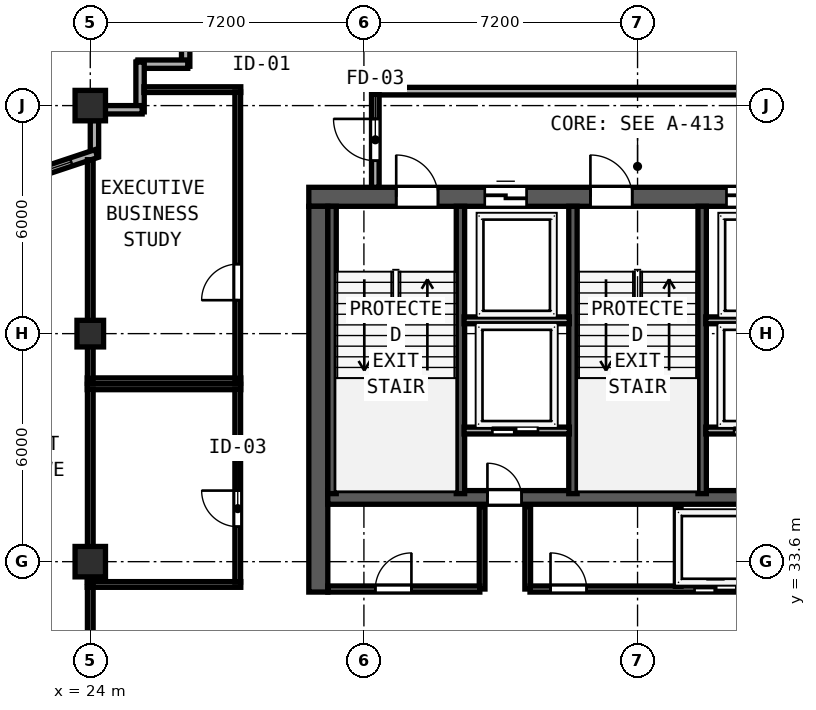
"""IFC4 building model, lengths in metres.
Left out: names, types, materials, properties, quantities, classifications, styles, units other than length and angle.
Written with IfcOpenShell. Run it as: python <this file> out.ifc"""

import sys

from ifc_helpers import new_model, si_unit, direction, frame, frame_2d, origin, origin_2d, place, context, subcontext, project, spatial, rectangle, hollow_rectangle, extrude, element, fill, save


model = new_model("IFC4")
c1 = context("Model", 3, precision=1e-05, world=origin(), true_north=direction((0.0, 1.0)))
c2 = subcontext(c1, "Body", "Model", "MODEL_VIEW")
j1 = project(units=[si_unit("LENGTHUNIT", "METRE"), si_unit("PLANEANGLEUNIT", "RADIAN")], contexts=[c1])
p1 = place(None, origin())
s1 = spatial("IfcSite", under=j1, at=p1, CompositionType="ELEMENT")
p2 = place(p1, origin())
s2 = spatial("IfcBuilding", under=s1, at=p2, CompositionType="ELEMENT")
p3 = place(p2, frame((0.0, 0.0, 239.05)))
s3 = spatial("IfcBuildingStorey", under=s2, at=p3, CompositionType="ELEMENT", Elevation=239.05)
p4 = place(p3, frame((29.75, 43.2, 0.0), z_axis=(0.0, 0.0, 1.0), x_axis=(1.0, 0.0, 0.0)))
e1 = element("IfcWall", 1, at=p4, inside=s3, PredefinedType="SHEAR", context=c2, shape_type="SweptSolid", body=[
    extrude(rectangle(XDim=17.3, YDim=0.5, at=frame_2d((8.65, 0.0))), origin(), (0.0, 0.0, 1.0), 3.67),
])
p5 = place(p4, frame((2.3, 0.0, 0.0)))
e2 = element("IfcOpeningElement", 2, at=p5, cuts=e1, PredefinedType="OPENING", context=c2, shape_type="SweptSolid", body=[
    extrude(rectangle(XDim=1.1, YDim=2.15, at=frame_2d((0.55, 1.075))), frame((0.0, 0.26, 0.0), z_axis=(0.0, -1.0, 0.0), x_axis=(1.0, 0.0, 0.0)), (0.0, 0.0, 1.0), 0.52),
])
p6 = place(p4, frame((7.41, 0.0, 0.0)))
e3 = element("IfcOpeningElement", 3, at=p6, cuts=e1, PredefinedType="OPENING", context=c2, shape_type="SweptSolid", body=[
    extrude(rectangle(XDim=1.1, YDim=2.15, at=frame_2d((0.55, 1.075))), frame((0.0, 0.26, 0.0), z_axis=(0.0, -1.0, 0.0), x_axis=(1.0, 0.0, 0.0)), (0.0, 0.0, 1.0), 0.52),
])
p7 = place(p4, frame((13.5, 0.0, 0.0)))
e4 = element("IfcOpeningElement", 4, at=p7, cuts=e1, PredefinedType="OPENING", context=c2, shape_type="SweptSolid", body=[
    extrude(rectangle(XDim=1.1, YDim=2.15, at=frame_2d((0.55, 1.075))), frame((0.0, 0.26, 0.0), z_axis=(0.0, -1.0, 0.0), x_axis=(1.0, 0.0, 0.0)), (0.0, 0.0, 1.0), 0.52),
])
p8 = place(p4, frame((4.63, 0.0, 0.0)))
e5 = element("IfcOpeningElement", 5, at=p8, cuts=e1, PredefinedType="OPENING", context=c2, shape_type="SweptSolid", body=[
    extrude(rectangle(XDim=1.1, YDim=2.2, at=frame_2d((0.55, 1.1))), frame((0.0, 0.26, 0.0), z_axis=(0.0, -1.0, 0.0), x_axis=(1.0, 0.0, 0.0)), (0.0, 0.0, 1.0), 0.52),
])
p9 = place(p4, frame((10.99, 0.0, 0.0)))
e6 = element("IfcOpeningElement", 6, at=p9, cuts=e1, PredefinedType="OPENING", context=c2, shape_type="SweptSolid", body=[
    extrude(rectangle(XDim=1.1, YDim=2.2, at=frame_2d((0.55, 1.1))), frame((0.0, 0.26, 0.0), z_axis=(0.0, -1.0, 0.0), x_axis=(1.0, 0.0, 0.0)), (0.0, 0.0, 1.0), 0.52),
])
p10 = place(p3, frame((30.0, 32.8, 0.0), z_axis=(0.0, 0.0, 1.0), x_axis=(0.0, 1.0, 0.0)))
e7 = element("IfcWall", 7, at=p10, inside=s3, PredefinedType="SHEAR", context=c2, shape_type="SweptSolid", body=[
    extrude(rectangle(XDim=10.15, YDim=0.5, at=frame_2d((5.075, 0.0))), origin(), (0.0, 0.0, 1.0), 3.67),
])
p11 = place(p3, frame((30.25, 35.29, 0.0), z_axis=(0.0, 0.0, 1.0), x_axis=(1.0, 0.0, 0.0)))
e8 = element("IfcWall", 8, at=p11, inside=s3, PredefinedType="SHEAR", context=c2, shape_type="SweptSolid", body=[
    extrude(rectangle(XDim=16.3, YDim=0.36, at=frame_2d((8.15, 0.0))), origin(), (0.0, 0.0, 1.0), 3.67),
])
p12 = place(p11, frame((5.1, 0.0, 0.0), z_axis=(0.0, 0.0, 1.0), x_axis=(-1.0, 0.0, 0.0)))
e9 = element("IfcOpeningElement", 9, at=p12, cuts=e8, PredefinedType="OPENING", context=c2, shape_type="SweptSolid", body=[
    extrude(rectangle(XDim=0.9, YDim=2.1, at=frame_2d((0.45, 1.05))), frame((0.0, 0.19, 0.0), z_axis=(0.0, -1.0, 0.0), x_axis=(1.0, 0.0, 0.0)), (0.0, 0.0, 1.0), 0.38),
])
p13 = place(p11, frame((12.16, 0.0, 0.0), z_axis=(0.0, 0.0, 1.0), x_axis=(-1.0, 0.0, 0.0)))
e10 = element("IfcOpeningElement", 10, at=p13, cuts=e8, PredefinedType="OPENING", context=c2, shape_type="SweptSolid", body=[
    extrude(rectangle(XDim=0.9, YDim=2.1, at=frame_2d((0.45, 1.05))), frame((0.0, 0.19, 0.0), z_axis=(0.0, -1.0, 0.0), x_axis=(1.0, 0.0, 0.0)), (0.0, 0.0, 1.0), 0.38),
])
for number, where, z_axis, x_axis in (
    (11, (30.362, 35.39, 0.0), (0.0, 0.0, 1.0), (0.0, 1.0, 0.0)),
    (12, (33.74, 35.39, 0.0), (0.0, 0.0, 1.0), (0.0, 1.0, 0.0)),
    (13, (36.7, 35.39, 0.0), (0.0, 0.0, 1.0), (0.0, 1.0, 0.0)),
    (14, (40.1, 35.39, 0.0), (0.0, 0.0, 1.0), (0.0, 1.0, 0.0)),
):
    element("IfcWall", number, at=place(p3, frame(where, z_axis=z_axis, x_axis=x_axis)), inside=s3, PredefinedType="SHEAR", context=c2, shape_type="SweptSolid", body=[
        extrude(rectangle(XDim=7.56, YDim=0.22, at=frame_2d((3.78, 0.0))), origin(), (0.0, 0.0, 1.0), 3.67),
    ])
for number, where, z_axis, x_axis in (
    (15, (24.0, 33.6, 0.0), (0.0, 0.0, 1.0), (1.0, 0.0, 0.0)),
    (16, (24.0, 45.6, 0.0), (0.0, 0.0, 1.0), (1.0, 0.0, 0.0)),
):
    element("IfcColumn", number, at=place(p3, frame(where, z_axis=z_axis, x_axis=x_axis)), inside=s3, PredefinedType="COLUMN", context=c2, shape_type="SweptSolid", body=[
        extrude(hollow_rectangle(XDim=0.8, YDim=0.8, WallThickness=0.03, at=origin_2d()), origin(), (0.0, 0.0, 1.0), 3.85),
    ])
p14 = place(p3, frame((24.0, 39.6, 0.0), z_axis=(0.0, 0.0, 1.0), x_axis=(1.0, 0.0, 0.0)))
e17 = element("IfcColumn", 17, at=p14, inside=s3, PredefinedType="COLUMN", context=c2, shape_type="SweptSolid", body=[
    extrude(hollow_rectangle(XDim=0.7, YDim=0.7, WallThickness=0.026, at=origin_2d()), origin(), (0.0, 0.0, 1.0), 3.85),
])
p15 = place(p3, frame((26.51, 48.0, 0.0), z_axis=(0.0, 0.0, 1.0), x_axis=(0.0, -1.0, 0.0)))
e18 = element("IfcWall", 18, at=p15, inside=s3, PredefinedType="SOLIDWALL", context=c2, shape_type="SweptSolid", body=[
    extrude(rectangle(XDim=1.365, YDim=0.22, at=frame_2d((0.683, 0.0))), origin(), (0.0, 0.0, 1.0), 3.67),
])
for number, where, z_axis, x_axis in (
    (19, (26.565, 46.69, 0.0), (0.0, 0.0, 1.0), (-1.0, 0.0, 0.0)),
    (20, (25.31, 46.745, 0.0), (0.0, 0.0, 1.0), (0.0, -1.0, 0.0)),
):
    element("IfcWall", number, at=place(p3, frame(where, z_axis=z_axis, x_axis=x_axis)), inside=s3, PredefinedType="SOLIDWALL", context=c2, shape_type="SweptSolid", body=[
        extrude(rectangle(XDim=1.31, YDim=0.22, at=frame_2d((0.655, 0.0))), origin(), (0.0, 0.0, 1.0), 3.67),
    ])
p16 = place(p3, frame((25.365, 45.49, 0.0), z_axis=(0.0, 0.0, 1.0), x_axis=(-1.0, 0.0, 0.0)))
e21 = element("IfcWall", 21, at=p16, inside=s3, PredefinedType="SOLIDWALL", context=c2, shape_type="SweptSolid", body=[
    extrude(rectangle(XDim=0.973, YDim=0.22, at=frame_2d((0.486, 0.0))), origin(), (0.0, 0.0, 1.0), 3.67),
])
p17 = place(p3, frame((24.11, 45.208, 0.0), z_axis=(0.0, 0.0, 1.0), x_axis=(0.0, -1.0, 0.0)))
e22 = element("IfcWall", 22, at=p17, inside=s3, PredefinedType="SOLIDWALL", context=c2, shape_type="SweptSolid", body=[
    extrude(rectangle(XDim=0.942, YDim=0.22, at=frame_2d((0.471, 0.0))), origin(), (0.0, 0.0, 1.0), 3.315),
])
p18 = place(p3, frame((24.162, 44.338, 0.0), z_axis=(0.0, 0.0, 1.0), x_axis=(-0.948687165594, -0.31621616315, 0.0)))
e23 = element("IfcWall", 23, at=p18, inside=s3, PredefinedType="SOLIDWALL", context=c2, shape_type="SweptSolid", body=[
    extrude(rectangle(XDim=6.312, YDim=0.22, at=frame_2d((3.156, 0.0))), origin(), (0.0, 0.0, 1.0), 3.315),
])
p19 = place(p18, frame((0.7, 0.0, 0.85)))
e24 = element("IfcOpeningElement", 24, at=p19, cuts=e23, PredefinedType="OPENING", context=c2, shape_type="SweptSolid", body=[
    extrude(rectangle(XDim=1.25, YDim=1.95, at=frame_2d((0.625, 0.975))), frame((0.0, 0.12, 0.0), z_axis=(0.0, -1.0, 0.0), x_axis=(1.0, 0.0, 0.0)), (0.0, 0.0, 1.0), 0.24),
])
p20 = place(p3, frame((31.5, 45.98, 0.0), z_axis=(0.0, 0.0, 1.0), x_axis=(1.0, 0.0, 0.0)))
e25 = element("IfcWall", 25, at=p20, inside=s3, PredefinedType="SOLIDWALL", context=c2, shape_type="SweptSolid", body=[
    extrude(rectangle(XDim=13.8, YDim=0.2, at=frame_2d((6.9, 0.0))), origin(), (0.0, 0.0, 1.0), 3.67),
])
p21 = place(p3, frame((31.5, 43.45, 0.0), z_axis=(0.0, 0.0, 1.0), x_axis=(0.0, 1.0, 0.0)))
e26 = element("IfcWall", 26, at=p21, inside=s3, PredefinedType="SOLIDWALL", context=c2, shape_type="SweptSolid", body=[
    extrude(rectangle(XDim=2.445, YDim=0.2, at=frame_2d((1.223, 0.0))), origin(), (0.0, 0.0, 1.0), 3.67),
])
p22 = place(p21, frame((1.8, 0.0, 0.0), z_axis=(0.0, 0.0, 1.0), x_axis=(-1.0, 0.0, 0.0)))
e27 = element("IfcOpeningElement", 27, at=p22, cuts=e26, PredefinedType="OPENING", context=c2, shape_type="SweptSolid", body=[
    extrude(rectangle(XDim=1.1, YDim=2.15, at=frame_2d((0.55, 1.075))), frame((0.0, 0.11, 0.0), z_axis=(0.0, -1.0, 0.0), x_axis=(1.0, 0.0, 0.0)), (0.0, 0.0, 1.0), 0.22),
])
for number, where, z_axis, x_axis in (
    (28, (33.835, 39.95, 0.0), (0.0, 0.0, 1.0), (1.0, 0.0, 0.0)),
    (29, (40.195, 39.95, 0.0), (0.0, 0.0, 1.0), (1.0, 0.0, 0.0)),
):
    element("IfcWall", number, at=place(p3, frame(where, z_axis=z_axis, x_axis=x_axis)), inside=s3, PredefinedType="SOLIDWALL", context=c2, shape_type="SweptSolid", body=[
        extrude(rectangle(XDim=2.77, YDim=0.18, at=frame_2d((1.385, 0.0))), origin(), (0.0, 0.0, 1.0), 3.67),
    ])
p23 = place(p3, frame((33.835, 37.05, 0.0), z_axis=(0.0, 0.0, 1.0), x_axis=(1.0, 0.0, 0.0)))
e30 = element("IfcWall", 30, at=p23, inside=s3, PredefinedType="SOLIDWALL", context=c2, shape_type="SweptSolid", body=[
    extrude(rectangle(XDim=2.77, YDim=0.18, at=frame_2d((1.385, 0.0))), origin(), (0.0, 0.0, 1.0), 3.67),
])
p24 = place(p23, frame((1.945, 0.0, 0.0), z_axis=(0.0, 0.0, 1.0), x_axis=(-1.0, 0.0, 0.0)))
e31 = element("IfcOpeningElement", 31, at=p24, cuts=e30, PredefinedType="OPENING", context=c2, shape_type="SweptSolid", body=[
    extrude(rectangle(XDim=1.2, YDim=2.2, at=frame_2d((0.6, 1.1))), frame((0.0, 0.1, 0.0), z_axis=(0.0, -1.0, 0.0), x_axis=(1.0, 0.0, 0.0)), (0.0, 0.0, 1.0), 0.2),
])
for number, where, z_axis, x_axis in (
    (32, (34.31, 32.88, 0.0), (0.0, 0.0, 1.0), (0.0, 1.0, 0.0)),
    (33, (35.51, 32.88, 0.0), (0.0, 0.0, 1.0), (0.0, 1.0, 0.0)),
):
    element("IfcWall", number, at=place(p3, frame(where, z_axis=z_axis, x_axis=x_axis)), inside=s3, PredefinedType="SOLIDWALL", context=c2, shape_type="SweptSolid", body=[
        extrude(rectangle(XDim=2.17, YDim=0.15, at=frame_2d((1.085, 0.0))), origin(), (0.0, 0.0, 1.0), 3.67),
    ])
p25 = place(p3, frame((40.195, 37.05, 0.0), z_axis=(0.0, 0.0, 1.0), x_axis=(1.0, 0.0, 0.0)))
e34 = element("IfcWall", 34, at=p25, inside=s3, PredefinedType="SOLIDWALL", context=c2, shape_type="SweptSolid", body=[
    extrude(rectangle(XDim=2.77, YDim=0.18, at=frame_2d((1.385, 0.0))), origin(), (0.0, 0.0, 1.0), 3.67),
])
p26 = place(p25, frame((1.945, 0.0, 0.0), z_axis=(0.0, 0.0, 1.0), x_axis=(-1.0, 0.0, 0.0)))
e35 = element("IfcOpeningElement", 35, at=p26, cuts=e34, PredefinedType="OPENING", context=c2, shape_type="SweptSolid", body=[
    extrude(rectangle(XDim=1.2, YDim=2.2, at=frame_2d((0.6, 1.1))), frame((0.0, 0.1, 0.0), z_axis=(0.0, -1.0, 0.0), x_axis=(1.0, 0.0, 0.0)), (0.0, 0.0, 1.0), 0.2),
])
p27 = place(p3, frame((30.25, 32.88, 0.0), z_axis=(0.0, 0.0, 1.0), x_axis=(1.0, 0.0, 0.0)))
e36 = element("IfcWall", 36, at=p27, inside=s3, PredefinedType="SOLIDWALL", context=c2, shape_type="SweptSolid", body=[
    extrude(rectangle(XDim=4.0, YDim=0.16, at=frame_2d((2.0, 0.0))), origin(), (0.0, 0.0, 1.0), 3.67),
])
p28 = place(p27, frame((2.2, 0.0, 0.0), z_axis=(0.0, 0.0, 1.0), x_axis=(-1.0, 0.0, 0.0)))
e37 = element("IfcOpeningElement", 37, at=p28, cuts=e36, PredefinedType="OPENING", context=c2, shape_type="SweptSolid", body=[
    extrude(rectangle(XDim=0.95, YDim=2.12, at=frame_2d((0.475, 1.06))), frame((0.0, 0.09, 0.0), z_axis=(0.0, -1.0, 0.0), x_axis=(1.0, 0.0, 0.0)), (0.0, 0.0, 1.0), 0.18),
])
p29 = place(p3, frame((35.57, 32.88, 0.0), z_axis=(0.0, 0.0, 1.0), x_axis=(1.0, 0.0, 0.0)))
e38 = element("IfcWall", 38, at=p29, inside=s3, PredefinedType="SOLIDWALL", context=c2, shape_type="SweptSolid", body=[
    extrude(rectangle(XDim=5.74, YDim=0.16, at=frame_2d((2.87, 0.0))), origin(), (0.0, 0.0, 1.0), 3.67),
])
p30 = place(p29, frame((1.49, 0.0, 0.0), z_axis=(0.0, 0.0, 1.0), x_axis=(-1.0, 0.0, 0.0)))
e39 = element("IfcOpeningElement", 39, at=p30, cuts=e38, PredefinedType="OPENING", context=c2, shape_type="SweptSolid", body=[
    extrude(rectangle(XDim=0.95, YDim=2.12, at=frame_2d((0.475, 1.06))), frame((0.0, 0.09, 0.0), z_axis=(0.0, -1.0, 0.0), x_axis=(1.0, 0.0, 0.0)), (0.0, 0.0, 1.0), 0.18),
])
p31 = place(p29, frame((5.43, 0.0, 0.0), z_axis=(0.0, 0.0, 1.0), x_axis=(-1.0, 0.0, 0.0)))
e40 = element("IfcOpeningElement", 40, at=p31, cuts=e38, PredefinedType="OPENING", context=c2, shape_type="SweptSolid", body=[
    extrude(rectangle(XDim=1.1, YDim=2.2, at=frame_2d((0.55, 1.1))), frame((0.0, 0.09, 0.0), z_axis=(0.0, -1.0, 0.0), x_axis=(1.0, 0.0, 0.0)), (0.0, 0.0, 1.0), 0.18),
])
p32 = place(p3, frame((39.47, 32.95, 0.0), z_axis=(0.0, 0.0, 1.0), x_axis=(0.0, 1.0, 0.0)))
e41 = element("IfcWall", 41, at=p32, inside=s3, PredefinedType="SOLIDWALL", context=c2, shape_type="SweptSolid", body=[
    extrude(rectangle(XDim=2.05, YDim=0.15, at=frame_2d((1.025, 0.0))), origin(), (0.0, 0.0, 1.0), 3.67),
])
for number, where, z_axis, x_axis in (
    (42, (23.92, 38.2, 0.0), (0.0, 0.0, 1.0), (1.0, 0.0, 0.0)),
    (43, (23.92, 33.0, 0.0), (0.0, 0.0, 1.0), (1.0, 0.0, 0.0)),
):
    element("IfcWall", number, at=place(p3, frame(where, z_axis=z_axis, x_axis=x_axis)), inside=s3, PredefinedType="PARTITIONING", context=c2, shape_type="SweptSolid", body=[
        extrude(rectangle(XDim=4.04, YDim=0.15, at=frame_2d((2.02, 0.0))), origin(), (0.0, 0.0, 1.0), 3.67),
    ])
p33 = place(p3, frame((24.0, 33.06, 0.0), z_axis=(0.0, 0.0, 1.0), x_axis=(0.0, 1.0, 0.0)))
e44 = element("IfcWall", 44, at=p33, inside=s3, PredefinedType="PARTITIONING", context=c2, shape_type="SweptSolid", body=[
    extrude(rectangle(XDim=5.08, YDim=0.15, at=frame_2d((2.54, 0.0))), origin(), (0.0, 0.0, 1.0), 3.315),
])
p34 = place(p3, frame((27.88, 33.06, 0.0), z_axis=(0.0, 0.0, 1.0), x_axis=(0.0, 1.0, 0.0)))
e45 = element("IfcWall", 45, at=p34, inside=s3, PredefinedType="PARTITIONING", context=c2, shape_type="SweptSolid", body=[
    extrude(rectangle(XDim=5.08, YDim=0.15, at=frame_2d((2.54, 0.0))), origin(), (0.0, 0.0, 1.0), 3.67),
])
p35 = place(p34, frame((2.41, 0.0, 0.0), z_axis=(0.0, 0.0, 1.0), x_axis=(-1.0, 0.0, 0.0)))
e46 = element("IfcOpeningElement", 46, at=p35, cuts=e45, PredefinedType="OPENING", context=c2, shape_type="SweptSolid", body=[
    extrude(rectangle(XDim=0.95, YDim=2.12, at=frame_2d((0.475, 1.06))), frame((0.0, 0.085, 0.0), z_axis=(0.0, -1.0, 0.0), x_axis=(1.0, 0.0, 0.0)), (0.0, 0.0, 1.0), 0.17),
])
p36 = place(p3, frame((25.412, 46.02, 0.0), z_axis=(0.0, 0.0, 1.0), x_axis=(1.0, 0.0, 0.0)))
e47 = element("IfcWall", 47, at=p36, inside=s3, PredefinedType="PARTITIONING", context=c2, shape_type="SweptSolid", body=[
    extrude(rectangle(XDim=2.548, YDim=0.15, at=frame_2d((1.274, 0.0))), origin(), (0.0, 0.0, 1.0), 3.67),
])
p37 = place(p3, frame((23.92, 38.36, 0.0), z_axis=(0.0, 0.0, 1.0), x_axis=(1.0, 0.0, 0.0)))
e48 = element("IfcWall", 48, at=p37, inside=s3, PredefinedType="PARTITIONING", context=c2, shape_type="SweptSolid", body=[
    extrude(rectangle(XDim=4.04, YDim=0.15, at=frame_2d((2.02, 0.0))), origin(), (0.0, 0.0, 1.0), 3.67),
])
p38 = place(p3, frame((24.0, 38.42, 0.0), z_axis=(0.0, 0.0, 1.0), x_axis=(0.0, 1.0, 0.0)))
e49 = element("IfcWall", 49, at=p38, inside=s3, PredefinedType="PARTITIONING", context=c2, shape_type="SweptSolid", body=[
    extrude(rectangle(XDim=5.757, YDim=0.15, at=frame_2d((2.878, 0.0))), origin(), (0.0, 0.0, 1.0), 3.315),
])
p39 = place(p3, frame((27.88, 38.42, 0.0), z_axis=(0.0, 0.0, 1.0), x_axis=(0.0, 1.0, 0.0)))
e50 = element("IfcWall", 50, at=p39, inside=s3, PredefinedType="PARTITIONING", context=c2, shape_type="SweptSolid", body=[
    extrude(rectangle(XDim=7.54, YDim=0.15, at=frame_2d((3.77, 0.0))), origin(), (0.0, 0.0, 1.0), 3.67),
])
p40 = place(p39, frame((3.01, 0.0, 0.0), z_axis=(0.0, 0.0, 1.0), x_axis=(-1.0, 0.0, 0.0)))
e51 = element("IfcOpeningElement", 51, at=p40, cuts=e50, PredefinedType="OPENING", context=c2, shape_type="SweptSolid", body=[
    extrude(rectangle(XDim=0.95, YDim=2.12, at=frame_2d((0.475, 1.06))), frame((0.0, 0.085, 0.0), z_axis=(0.0, -1.0, 0.0), x_axis=(1.0, 0.0, 0.0)), (0.0, 0.0, 1.0), 0.17),
])
p41 = place(p3, frame((24.0, 26.94, 0.0), z_axis=(0.0, 0.0, 1.0), x_axis=(0.0, 1.0, 0.0)))
e52 = element("IfcWall", 52, at=p41, inside=s3, PredefinedType="PARTITIONING", context=c2, shape_type="SweptSolid", body=[
    extrude(rectangle(XDim=6.0, YDim=0.15, at=frame_2d((3.0, 0.0))), origin(), (0.0, 0.0, 1.0), 3.315),
])
p42 = place(p19, origin())
e53 = element("IfcWindow", 53, at=p42, inside=s3, PartitioningType="SINGLE_PANEL", PredefinedType="WINDOW", context=c2, shape_type="SweptSolid", body=[
    extrude(rectangle(XDim=1.25, YDim=1.95, at=frame_2d((0.625, 0.975))), frame((0.0, 0.03, 0.0), z_axis=(0.0, -1.0, 0.0), x_axis=(1.0, 0.0, 0.0)), (0.0, 0.0, 1.0), 0.06),
])
fill(e24, e53)
p43 = place(p5, origin())
e54 = element("IfcDoor", 54, at=p43, inside=s3, OperationType="SINGLE_SWING_LEFT", PredefinedType="DOOR", context=c2, shape_type="SweptSolid", body=[
    extrude(rectangle(XDim=1.1, YDim=2.15, at=frame_2d((0.55, 1.075))), frame((0.0, 0.185, 0.0), z_axis=(0.0, -1.0, 0.0), x_axis=(1.0, 0.0, 0.0)), (0.0, 0.0, 1.0), 0.05),
])
fill(e2, e54)
p44 = place(p6, origin())
e55 = element("IfcDoor", 55, at=p44, inside=s3, OperationType="SINGLE_SWING_LEFT", PredefinedType="DOOR", context=c2, shape_type="SweptSolid", body=[
    extrude(rectangle(XDim=1.1, YDim=2.15, at=frame_2d((0.55, 1.075))), frame((0.0, 0.185, 0.0), z_axis=(0.0, -1.0, 0.0), x_axis=(1.0, 0.0, 0.0)), (0.0, 0.0, 1.0), 0.05),
])
fill(e3, e55)
p45 = place(p22, origin())
e56 = element("IfcDoor", 56, at=p45, inside=s3, OperationType="SINGLE_SWING_LEFT", PredefinedType="DOOR", context=c2, shape_type="SweptSolid", body=[
    extrude(rectangle(XDim=1.1, YDim=2.15, at=frame_2d((0.55, 1.075))), frame((0.0, 0.025, 0.0), z_axis=(0.0, -1.0, 0.0), x_axis=(1.0, 0.0, 0.0)), (0.0, 0.0, 1.0), 0.05),
])
fill(e27, e56)
p46 = place(p8, origin())
e57 = element("IfcDoor", 57, at=p46, inside=s3, OperationType="SLIDING_TO_LEFT", PredefinedType="DOOR", context=c2, shape_type="SweptSolid", body=[
    extrude(rectangle(XDim=1.1, YDim=2.2, at=frame_2d((0.55, 1.1))), frame((0.0, 0.185, 0.0), z_axis=(0.0, -1.0, 0.0), x_axis=(1.0, 0.0, 0.0)), (0.0, 0.0, 1.0), 0.05),
])
fill(e5, e57)
p47 = place(p9, origin())
e58 = element("IfcDoor", 58, at=p47, inside=s3, OperationType="SLIDING_TO_LEFT", PredefinedType="DOOR", context=c2, shape_type="SweptSolid", body=[
    extrude(rectangle(XDim=1.1, YDim=2.2, at=frame_2d((0.55, 1.1))), frame((0.0, 0.185, 0.0), z_axis=(0.0, -1.0, 0.0), x_axis=(1.0, 0.0, 0.0)), (0.0, 0.0, 1.0), 0.05),
])
fill(e6, e58)
p48 = place(p24, origin())
e59 = element("IfcDoor", 59, at=p48, inside=s3, OperationType="SLIDING_TO_RIGHT", PredefinedType="DOOR", context=c2, shape_type="SweptSolid", body=[
    extrude(rectangle(XDim=1.2, YDim=2.2, at=frame_2d((0.6, 1.1))), frame((0.0, 0.025, 0.0), z_axis=(0.0, -1.0, 0.0), x_axis=(1.0, 0.0, 0.0)), (0.0, 0.0, 1.0), 0.05),
])
fill(e31, e59)
p49 = place(p12, origin())
e60 = element("IfcDoor", 60, at=p49, inside=s3, OperationType="SINGLE_SWING_RIGHT", PredefinedType="DOOR", context=c2, shape_type="SweptSolid", body=[
    extrude(rectangle(XDim=0.9, YDim=2.1, at=frame_2d((0.45, 1.05))), frame((0.0, 0.025, 0.0), z_axis=(0.0, -1.0, 0.0), x_axis=(1.0, 0.0, 0.0)), (0.0, 0.0, 1.0), 0.05),
])
fill(e9, e60)
p50 = place(p26, origin())
e61 = element("IfcDoor", 61, at=p50, inside=s3, OperationType="SLIDING_TO_RIGHT", PredefinedType="DOOR", context=c2, shape_type="SweptSolid", body=[
    extrude(rectangle(XDim=1.2, YDim=2.2, at=frame_2d((0.6, 1.1))), frame((0.0, 0.025, 0.0), z_axis=(0.0, -1.0, 0.0), x_axis=(1.0, 0.0, 0.0)), (0.0, 0.0, 1.0), 0.05),
])
fill(e35, e61)
p51 = place(p28, origin())
e62 = element("IfcDoor", 62, at=p51, inside=s3, OperationType="SINGLE_SWING_LEFT", PredefinedType="DOOR", context=c2, shape_type="SweptSolid", body=[
    extrude(rectangle(XDim=0.95, YDim=2.12, at=frame_2d((0.475, 1.06))), frame((0.0, 0.025, 0.0), z_axis=(0.0, -1.0, 0.0), x_axis=(1.0, 0.0, 0.0)), (0.0, 0.0, 1.0), 0.05),
])
fill(e37, e62)
p52 = place(p30, origin())
e63 = element("IfcDoor", 63, at=p52, inside=s3, OperationType="SINGLE_SWING_RIGHT", PredefinedType="DOOR", context=c2, shape_type="SweptSolid", body=[
    extrude(rectangle(XDim=0.95, YDim=2.12, at=frame_2d((0.475, 1.06))), frame((0.0, 0.025, 0.0), z_axis=(0.0, -1.0, 0.0), x_axis=(1.0, 0.0, 0.0)), (0.0, 0.0, 1.0), 0.05),
])
fill(e39, e63)
p53 = place(p31, origin())
e64 = element("IfcDoor", 64, at=p53, inside=s3, OperationType="SLIDING_TO_RIGHT", PredefinedType="DOOR", context=c2, shape_type="SweptSolid", body=[
    extrude(rectangle(XDim=1.1, YDim=2.2, at=frame_2d((0.55, 1.1))), frame((0.0, 0.025, 0.0), z_axis=(0.0, -1.0, 0.0), x_axis=(1.0, 0.0, 0.0)), (0.0, 0.0, 1.0), 0.05),
])
fill(e40, e64)
p54 = place(p35, origin())
e65 = element("IfcDoor", 65, at=p54, inside=s3, OperationType="SINGLE_SWING_LEFT", PredefinedType="DOOR", context=c2, shape_type="SweptSolid", body=[
    extrude(rectangle(XDim=0.95, YDim=2.12, at=frame_2d((0.475, 1.06))), frame((0.0, 0.025, 0.0), z_axis=(0.0, -1.0, 0.0), x_axis=(1.0, 0.0, 0.0)), (0.0, 0.0, 1.0), 0.05),
])
fill(e46, e65)
p55 = place(p40, origin())
e66 = element("IfcDoor", 66, at=p55, inside=s3, OperationType="SINGLE_SWING_RIGHT", PredefinedType="DOOR", context=c2, shape_type="SweptSolid", body=[
    extrude(rectangle(XDim=0.95, YDim=2.12, at=frame_2d((0.475, 1.06))), frame((0.0, 0.025, 0.0), z_axis=(0.0, -1.0, 0.0), x_axis=(1.0, 0.0, 0.0)), (0.0, 0.0, 1.0), 0.05),
])
fill(e51, e66)
save(model, sys.argv[1])
